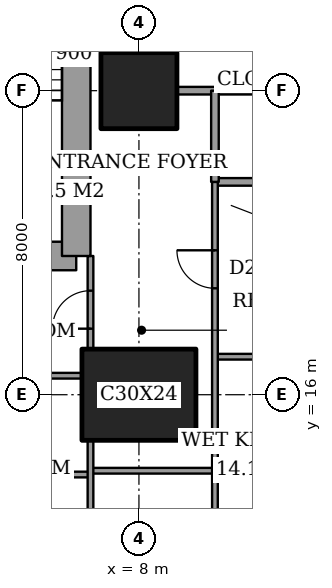
"""IFC4 building model, lengths in metres.
Left out: names, types, materials, properties, quantities, classifications, styles, units other than length and angle.
Written with IfcOpenShell. Run it as: python <this file> out.ifc"""

import sys

from ifc_helpers import new_model, si_unit, direction, frame, frame_2d, origin, origin_2d, place, context, subcontext, project, spatial, rectangle, extrude, element, fill, save


model = new_model("IFC4")
c1 = context("Model", 3, precision=1e-05, world=origin(), true_north=direction((0.0, 1.0)))
c2 = subcontext(c1, "Body", "Model", "MODEL_VIEW")
j1 = project(units=[si_unit("LENGTHUNIT", "METRE"), si_unit("PLANEANGLEUNIT", "RADIAN")], contexts=[c1])
p1 = place(None, origin())
s1 = spatial("IfcSite", under=j1, at=p1, CompositionType="ELEMENT")
p2 = place(p1, origin())
s2 = spatial("IfcBuilding", under=s1, at=p2, CompositionType="ELEMENT")
p3 = place(p2, frame((0.0, 0.0, 54.8)))
s3 = spatial("IfcBuildingStorey", under=s2, at=p3, CompositionType="ELEMENT", Elevation=54.8)
p4 = place(p3, frame((8.0, 16.0, 0.0), z_axis=(0.0, 0.0, 1.0), x_axis=(1.0, 0.0, 0.0)))
e1 = element("IfcColumn", 1, at=p4, inside=s3, PredefinedType="COLUMN", context=c2, shape_type="SweptSolid", body=[
    extrude(rectangle(XDim=3.0, YDim=2.4, at=origin_2d()), origin(), (0.0, 0.0, 1.0), 3.6),
])
p5 = place(p3, frame((8.0, 24.0, 0.0), z_axis=(0.0, 0.0, 1.0), x_axis=(1.0, 0.0, 0.0)))
e2 = element("IfcColumn", 2, at=p5, inside=s3, PredefinedType="COLUMN", context=c2, shape_type="SweptSolid", body=[
    extrude(rectangle(XDim=2.0, YDim=2.0, at=origin_2d()), origin(), (0.0, 0.0, 1.0), 3.6),
])
p6 = place(p3, frame((1.9, 19.65, 0.0), z_axis=(0.0, 0.0, 1.0), x_axis=(1.0, 0.0, 0.0)))
e3 = element("IfcWall", 3, at=p6, inside=s3, PredefinedType="SHEAR", context=c2, shape_type="SweptSolid", body=[
    extrude(rectangle(XDim=4.45, YDim=0.75, at=frame_2d((2.225, 0.0))), origin(), (0.0, 0.0, 1.0), 3.6),
])
p7 = place(p3, frame((6.35, 19.65, 0.0), z_axis=(0.0, 0.0, 1.0), x_axis=(0.0, 1.0, 0.0)))
e4 = element("IfcWall", 4, at=p7, inside=s3, PredefinedType="SHEAR", context=c2, shape_type="SweptSolid", body=[
    extrude(rectangle(XDim=8.7, YDim=0.75, at=frame_2d((4.35, 0.0))), origin(), (0.0, 0.0, 1.0), 3.6),
])
p8 = place(p7, frame((6.725, 0.0, 0.0)))
e5 = element("IfcOpeningElement", 5, at=p8, cuts=e4, PredefinedType="OPENING", context=c2, shape_type="SweptSolid", body=[
    extrude(rectangle(XDim=1.0, YDim=2.1, at=frame_2d((0.5, 1.05))), frame((0.0, 0.385, 0.0), z_axis=(0.0, -1.0, 0.0), x_axis=(1.0, 0.0, 0.0)), (0.0, 0.0, 1.0), 0.77),
])
p9 = place(p3, frame((4.325, 13.9, 0.0), z_axis=(0.0, 0.0, 1.0), x_axis=(1.0, 0.0, 0.0)))
e6 = element("IfcWall", 6, at=p9, inside=s3, PredefinedType="PARTITIONING", context=c2, shape_type="SweptSolid", body=[
    extrude(rectangle(XDim=2.4, YDim=0.15, at=frame_2d((1.2, 0.0))), origin(), (0.0, 0.0, 1.0), 3.35),
])
p10 = place(p3, frame((6.725, 14.0, 0.0), z_axis=(0.0, 0.0, 1.0), x_axis=(1.0, 0.0, 0.0)))
e7 = element("IfcWall", 7, at=p10, inside=s3, PredefinedType="PARTITIONING", context=c2, shape_type="SweptSolid", body=[
    extrude(rectangle(XDim=3.275, YDim=0.15, at=frame_2d((1.637, 0.0))), origin(), (0.0, 0.0, 1.0), 3.35),
])
p11 = place(p3, frame((1.35, 16.5, 0.0), z_axis=(0.0, 0.0, 1.0), x_axis=(1.0, 0.0, 0.0)))
e8 = element("IfcWall", 8, at=p11, inside=s3, PredefinedType="PARTITIONING", context=c2, shape_type="SweptSolid", body=[
    extrude(rectangle(XDim=5.15, YDim=0.15, at=frame_2d((2.575, 0.0))), origin(), (0.0, 0.0, 1.0), 3.35),
])
p12 = place(p3, frame((10.0, 17.0, 0.0), z_axis=(0.0, 0.0, 1.0), x_axis=(1.0, 0.0, 0.0)))
e9 = element("IfcWall", 9, at=p12, inside=s3, PredefinedType="PARTITIONING", context=c2, shape_type="SweptSolid", body=[
    extrude(rectangle(XDim=4.4, YDim=0.15, at=frame_2d((2.2, 0.0))), origin(), (0.0, 0.0, 1.0), 3.35),
])
p13 = place(p12, frame((2.8, 0.0, 0.0)))
e10 = element("IfcOpeningElement", 10, at=p13, cuts=e9, PredefinedType="OPENING", context=c2, shape_type="SweptSolid", body=[
    extrude(rectangle(XDim=1.0, YDim=2.1, at=frame_2d((0.5, 1.05))), frame((0.0, 0.085, 0.0), z_axis=(0.0, -1.0, 0.0), x_axis=(1.0, 0.0, 0.0)), (0.0, 0.0, 1.0), 0.17),
])
p14 = place(p3, frame((10.0, 21.6, 0.0), z_axis=(0.0, 0.0, 1.0), x_axis=(1.0, 0.0, 0.0)))
e11 = element("IfcWall", 11, at=p14, inside=s3, PredefinedType="PARTITIONING", context=c2, shape_type="SweptSolid", body=[
    extrude(rectangle(XDim=4.8, YDim=0.2, at=frame_2d((2.4, 0.0))), origin(), (0.0, 0.0, 1.0), 3.35),
])
p15 = place(p14, frame((1.95, 0.0, 0.0)))
e12 = element("IfcOpeningElement", 12, at=p15, cuts=e11, PredefinedType="OPENING", context=c2, shape_type="SweptSolid", body=[
    extrude(rectangle(XDim=0.9, YDim=2.1, at=frame_2d((0.45, 1.05))), frame((0.0, 0.11, 0.0), z_axis=(0.0, -1.0, 0.0), x_axis=(1.0, 0.0, 0.0)), (0.0, 0.0, 1.0), 0.22),
])
p16 = place(p3, frame((9.0, 24.0, 0.0), z_axis=(0.0, 0.0, 1.0), x_axis=(1.0, 0.0, 0.0)))
e13 = element("IfcWall", 13, at=p16, inside=s3, PredefinedType="PARTITIONING", context=c2, shape_type="SweptSolid", body=[
    extrude(rectangle(XDim=6.0, YDim=0.2, at=frame_2d((3.0, 0.0))), origin(), (0.0, 0.0, 1.0), 3.35),
])
p17 = place(p3, frame((6.725, 10.6, 0.0), z_axis=(0.0, 0.0, 1.0), x_axis=(0.0, 1.0, 0.0)))
e14 = element("IfcWall", 14, at=p17, inside=s3, PredefinedType="PARTITIONING", context=c2, shape_type="SweptSolid", body=[
    extrude(rectangle(XDim=4.2, YDim=0.15, at=frame_2d((2.1, 0.0))), origin(), (0.0, 0.0, 1.0), 3.35),
])
p18 = place(p17, frame((1.2, 0.0, 0.0)))
e15 = element("IfcOpeningElement", 15, at=p18, cuts=e14, PredefinedType="OPENING", context=c2, shape_type="SweptSolid", body=[
    extrude(rectangle(XDim=0.9, YDim=2.1, at=frame_2d((0.45, 1.05))), frame((0.0, 0.085, 0.0), z_axis=(0.0, -1.0, 0.0), x_axis=(1.0, 0.0, 0.0)), (0.0, 0.0, 1.0), 0.17),
])
p19 = place(p3, frame((6.725, 17.2, 0.0), z_axis=(0.0, 0.0, 1.0), x_axis=(0.0, 1.0, 0.0)))
e16 = element("IfcWall", 16, at=p19, inside=s3, PredefinedType="PARTITIONING", context=c2, shape_type="SweptSolid", body=[
    extrude(rectangle(XDim=2.45, YDim=0.15, at=frame_2d((1.225, 0.0))), origin(), (0.0, 0.0, 1.0), 3.35),
])
p20 = place(p19, frame((0.538, 0.0, 0.0)))
e17 = element("IfcOpeningElement", 17, at=p20, cuts=e16, PredefinedType="OPENING", context=c2, shape_type="SweptSolid", body=[
    extrude(rectangle(XDim=1.0, YDim=2.1, at=frame_2d((0.5, 1.05))), frame((0.0, 0.085, 0.0), z_axis=(0.0, -1.0, 0.0), x_axis=(1.0, 0.0, 0.0)), (0.0, 0.0, 1.0), 0.17),
])
p21 = place(p3, frame((10.0, 21.6, 0.0), z_axis=(0.0, 0.0, 1.0), x_axis=(0.0, 1.0, 0.0)))
e18 = element("IfcWall", 18, at=p21, inside=s3, PredefinedType="PARTITIONING", context=c2, shape_type="SweptSolid", body=[
    extrude(rectangle(XDim=2.4, YDim=0.2, at=frame_2d((1.2, 0.0))), origin(), (0.0, 0.0, 1.0), 3.35),
])
p22 = place(p3, frame((10.0, 10.6, 0.0), z_axis=(0.0, 0.0, 1.0), x_axis=(0.0, 1.0, 0.0)))
e19 = element("IfcWall", 19, at=p22, inside=s3, PredefinedType="PARTITIONING", context=c2, shape_type="SweptSolid", body=[
    extrude(rectangle(XDim=11.0, YDim=0.15, at=frame_2d((5.5, 0.0))), origin(), (0.0, 0.0, 1.0), 3.35),
])
p23 = place(p22, frame((8.2, 0.0, 0.0)))
e20 = element("IfcOpeningElement", 20, at=p23, cuts=e19, PredefinedType="OPENING", context=c2, shape_type="SweptSolid", body=[
    extrude(rectangle(XDim=1.0, YDim=2.1, at=frame_2d((0.5, 1.05))), frame((0.0, 0.085, 0.0), z_axis=(0.0, -1.0, 0.0), x_axis=(1.0, 0.0, 0.0)), (0.0, 0.0, 1.0), 0.17),
])
p24 = place(p20, origin())
e21 = element("IfcDoor", 21, at=p24, inside=s3, OperationType="SINGLE_SWING_RIGHT", PredefinedType="DOOR", context=c2, shape_type="SweptSolid", body=[
    extrude(rectangle(XDim=1.0, YDim=2.1, at=frame_2d((0.5, 1.05))), frame((0.0, 0.025, 0.0), z_axis=(0.0, -1.0, 0.0), x_axis=(1.0, 0.0, 0.0)), (0.0, 0.0, 1.0), 0.05),
])
fill(e17, e21)
p25 = place(p23, origin())
e22 = element("IfcDoor", 22, at=p25, inside=s3, OperationType="SINGLE_SWING_LEFT", PredefinedType="DOOR", context=c2, shape_type="SweptSolid", body=[
    extrude(rectangle(XDim=1.0, YDim=2.1, at=frame_2d((0.5, 1.05))), frame((0.0, 0.025, 0.0), z_axis=(0.0, -1.0, 0.0), x_axis=(1.0, 0.0, 0.0)), (0.0, 0.0, 1.0), 0.05),
])
fill(e20, e22)
save(model, sys.argv[1])
